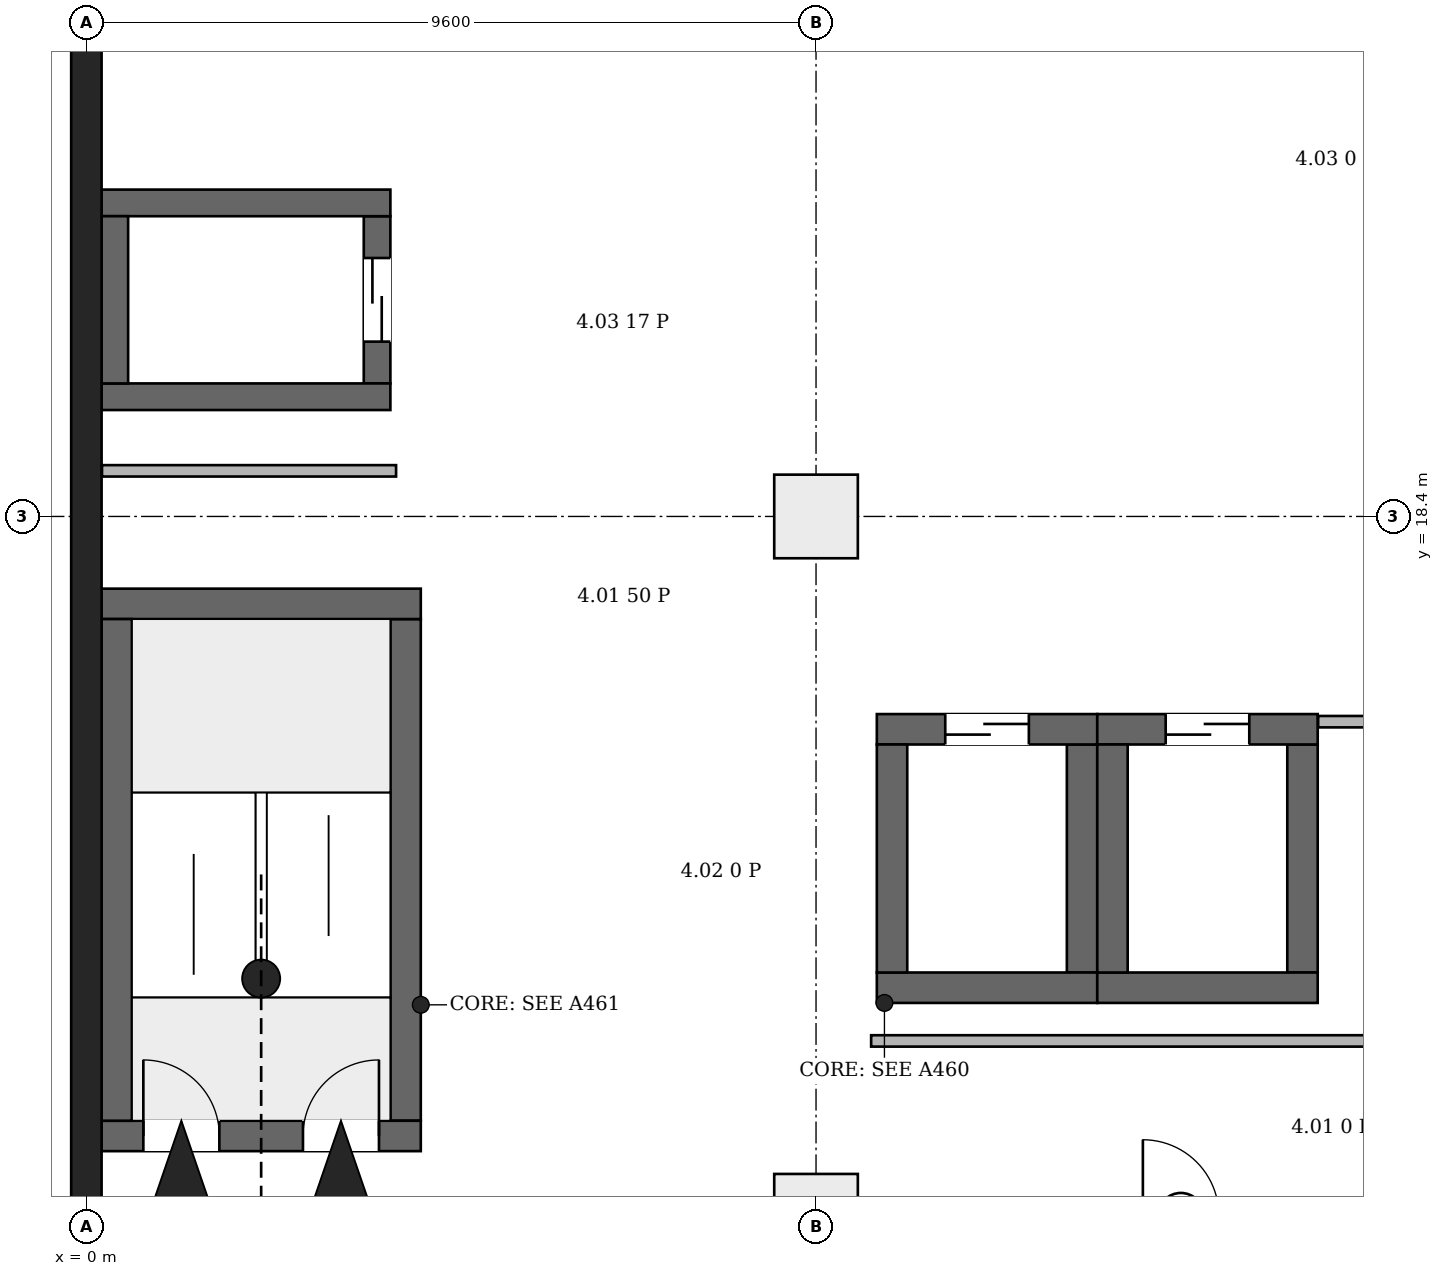
"""IFC4 building model, lengths in metres.
Left out: names, types, materials, properties, quantities, classifications, styles, units other than length and angle.
Written with IfcOpenShell. Run it as: python <this file> out.ifc"""

import sys

from ifc_helpers import new_model, si_unit, direction, frame, frame_2d, origin, origin_2d, place, context, subcontext, project, spatial, rectangle, extrude, element, fill, save


model = new_model("IFC4")
c1 = context("Model", 3, precision=1e-05, world=origin(), true_north=direction((0.0, 1.0)))
c2 = subcontext(c1, "Body", "Model", "MODEL_VIEW")
j1 = project(units=[si_unit("LENGTHUNIT", "METRE"), si_unit("PLANEANGLEUNIT", "RADIAN")], contexts=[c1])
p1 = place(None, origin())
s1 = spatial("IfcSite", under=j1, at=p1, CompositionType="ELEMENT")
p2 = place(p1, origin())
s2 = spatial("IfcBuilding", under=s1, at=p2, CompositionType="ELEMENT")
p3 = place(p2, frame((0.0, 0.0, 26.7)))
s3 = spatial("IfcBuildingStorey", under=s2, at=p3, CompositionType="ELEMENT", Elevation=26.7)
p4 = place(p3, frame((0.0, -0.2, 0.0), z_axis=(0.0, 0.0, 1.0), x_axis=(0.0, 1.0, 0.0)))
e1 = element("IfcWall", 1, at=p4, inside=s3, PredefinedType="SHEAR", context=c2, shape_type="SweptSolid", body=[
    extrude(rectangle(XDim=46.88, YDim=0.4, at=frame_2d((23.44, 0.0))), origin(), (0.0, 0.0, 1.0), 5.2),
])
p5 = place(p3, frame((0.2, 10.25, 0.0), z_axis=(0.0, 0.0, 1.0), x_axis=(1.0, 0.0, 0.0)))
e2 = element("IfcWall", 2, at=p5, inside=s3, PredefinedType="SHEAR", context=c2, shape_type="SweptSolid", body=[
    extrude(rectangle(XDim=4.2, YDim=0.4, at=frame_2d((2.1, 0.0))), origin(), (0.0, 0.0, 1.0), 5.2),
])
p6 = place(p5, frame((0.55, 0.0, 0.0)))
e3 = element("IfcOpeningElement", 3, at=p6, cuts=e2, PredefinedType="OPENING", context=c2, shape_type="SweptSolid", body=[
    extrude(rectangle(XDim=1.0, YDim=2.1, at=frame_2d((0.5, 1.05))), frame((0.0, 0.21, 0.0), z_axis=(0.0, -1.0, 0.0), x_axis=(1.0, 0.0, 0.0)), (0.0, 0.0, 1.0), 0.42),
])
p7 = place(p5, frame((2.65, 0.0, 0.0)))
e4 = element("IfcOpeningElement", 4, at=p7, cuts=e2, PredefinedType="OPENING", context=c2, shape_type="SweptSolid", body=[
    extrude(rectangle(XDim=1.0, YDim=2.1, at=frame_2d((0.5, 1.05))), frame((0.0, 0.21, 0.0), z_axis=(0.0, -1.0, 0.0), x_axis=(1.0, 0.0, 0.0)), (0.0, 0.0, 1.0), 0.42),
])
p8 = place(p3, frame((0.2, 17.25, 0.0), z_axis=(0.0, 0.0, 1.0), x_axis=(1.0, 0.0, 0.0)))
e5 = element("IfcWall", 5, at=p8, inside=s3, PredefinedType="SHEAR", context=c2, shape_type="SweptSolid", body=[
    extrude(rectangle(XDim=4.2, YDim=0.4, at=frame_2d((2.1, 0.0))), origin(), (0.0, 0.0, 1.0), 5.2),
])
for number, where, z_axis, x_axis in (
    (6, (0.4, 10.45, 0.0), (0.0, 0.0, 1.0), (0.0, 1.0, 0.0)),
    (7, (4.2, 10.45, 0.0), (0.0, 0.0, 1.0), (0.0, 1.0, 0.0)),
):
    element("IfcWall", number, at=place(p3, frame(where, z_axis=z_axis, x_axis=x_axis)), inside=s3, PredefinedType="SHEAR", context=c2, shape_type="SweptSolid", body=[
        extrude(rectangle(XDim=6.6, YDim=0.4, at=frame_2d((3.3, 0.0))), origin(), (0.0, 0.0, 1.0), 5.2),
    ])
for number, where, z_axis, x_axis in (
    (8, (0.2, 19.975, 0.0), (0.0, 0.0, 1.0), (1.0, 0.0, 0.0)),
    (9, (0.2, 22.525, 0.0), (0.0, 0.0, 1.0), (1.0, 0.0, 0.0)),
):
    element("IfcWall", number, at=place(p3, frame(where, z_axis=z_axis, x_axis=x_axis)), inside=s3, PredefinedType="SHEAR", context=c2, shape_type="SweptSolid", body=[
        extrude(rectangle(XDim=3.8, YDim=0.35, at=frame_2d((1.9, 0.0))), origin(), (0.0, 0.0, 1.0), 5.2),
    ])
p9 = place(p3, frame((0.375, 20.15, 0.0), z_axis=(0.0, 0.0, 1.0), x_axis=(0.0, 1.0, 0.0)))
e10 = element("IfcWall", 10, at=p9, inside=s3, PredefinedType="SHEAR", context=c2, shape_type="SweptSolid", body=[
    extrude(rectangle(XDim=2.2, YDim=0.35, at=frame_2d((1.1, 0.0))), origin(), (0.0, 0.0, 1.0), 5.2),
])
p10 = place(p3, frame((3.825, 20.15, 0.0), z_axis=(0.0, 0.0, 1.0), x_axis=(0.0, 1.0, 0.0)))
e11 = element("IfcWall", 11, at=p10, inside=s3, PredefinedType="SHEAR", context=c2, shape_type="SweptSolid", body=[
    extrude(rectangle(XDim=2.2, YDim=0.35, at=frame_2d((1.1, 0.0))), origin(), (0.0, 0.0, 1.0), 5.2),
])
p11 = place(p10, frame((0.55, 0.0, 0.0)))
e12 = element("IfcOpeningElement", 12, at=p11, cuts=e11, PredefinedType="OPENING", context=c2, shape_type="SweptSolid", body=[
    extrude(rectangle(XDim=1.1, YDim=2.1, at=frame_2d((0.55, 1.05))), frame((0.0, 0.185, 0.0), z_axis=(0.0, -1.0, 0.0), x_axis=(1.0, 0.0, 0.0)), (0.0, 0.0, 1.0), 0.37),
])
p12 = place(p3, frame((10.4, 12.2, 0.0), z_axis=(0.0, 0.0, 1.0), x_axis=(1.0, 0.0, 0.0)))
e13 = element("IfcWall", 13, at=p12, inside=s3, PredefinedType="SHEAR", context=c2, shape_type="SweptSolid", body=[
    extrude(rectangle(XDim=2.9, YDim=0.4, at=frame_2d((1.45, 0.0))), origin(), (0.0, 0.0, 1.0), 5.2),
])
p13 = place(p3, frame((10.4, 15.6, 0.0), z_axis=(0.0, 0.0, 1.0), x_axis=(1.0, 0.0, 0.0)))
e14 = element("IfcWall", 14, at=p13, inside=s3, PredefinedType="SHEAR", context=c2, shape_type="SweptSolid", body=[
    extrude(rectangle(XDim=2.9, YDim=0.4, at=frame_2d((1.45, 0.0))), origin(), (0.0, 0.0, 1.0), 5.2),
])
p14 = place(p13, frame((0.9, 0.0, 0.0)))
e15 = element("IfcOpeningElement", 15, at=p14, cuts=e14, PredefinedType="OPENING", context=c2, shape_type="SweptSolid", body=[
    extrude(rectangle(XDim=1.1, YDim=2.1, at=frame_2d((0.55, 1.05))), frame((0.0, 0.21, 0.0), z_axis=(0.0, -1.0, 0.0), x_axis=(1.0, 0.0, 0.0)), (0.0, 0.0, 1.0), 0.42),
])
for number, where, z_axis, x_axis in (
    (16, (10.6, 12.4, 0.0), (0.0, 0.0, 1.0), (0.0, 1.0, 0.0)),
    (17, (13.1, 12.4, 0.0), (0.0, 0.0, 1.0), (0.0, 1.0, 0.0)),
):
    element("IfcWall", number, at=place(p3, frame(where, z_axis=z_axis, x_axis=x_axis)), inside=s3, PredefinedType="SHEAR", context=c2, shape_type="SweptSolid", body=[
        extrude(rectangle(XDim=3.0, YDim=0.4, at=frame_2d((1.5, 0.0))), origin(), (0.0, 0.0, 1.0), 5.2),
    ])
p15 = place(p3, frame((13.3, 12.2, 0.0), z_axis=(0.0, 0.0, 1.0), x_axis=(1.0, 0.0, 0.0)))
e18 = element("IfcWall", 18, at=p15, inside=s3, PredefinedType="SHEAR", context=c2, shape_type="SweptSolid", body=[
    extrude(rectangle(XDim=2.9, YDim=0.4, at=frame_2d((1.45, 0.0))), origin(), (0.0, 0.0, 1.0), 5.2),
])
p16 = place(p3, frame((13.3, 15.6, 0.0), z_axis=(0.0, 0.0, 1.0), x_axis=(1.0, 0.0, 0.0)))
e19 = element("IfcWall", 19, at=p16, inside=s3, PredefinedType="SHEAR", context=c2, shape_type="SweptSolid", body=[
    extrude(rectangle(XDim=2.9, YDim=0.4, at=frame_2d((1.45, 0.0))), origin(), (0.0, 0.0, 1.0), 5.2),
])
p17 = place(p16, frame((0.9, 0.0, 0.0)))
e20 = element("IfcOpeningElement", 20, at=p17, cuts=e19, PredefinedType="OPENING", context=c2, shape_type="SweptSolid", body=[
    extrude(rectangle(XDim=1.1, YDim=2.1, at=frame_2d((0.55, 1.05))), frame((0.0, 0.21, 0.0), z_axis=(0.0, -1.0, 0.0), x_axis=(1.0, 0.0, 0.0)), (0.0, 0.0, 1.0), 0.42),
])
for number, where, z_axis, x_axis in (
    (21, (13.5, 12.4, 0.0), (0.0, 0.0, 1.0), (0.0, 1.0, 0.0)),
    (22, (16.0, 12.4, 0.0), (0.0, 0.0, 1.0), (0.0, 1.0, 0.0)),
):
    element("IfcWall", number, at=place(p3, frame(where, z_axis=z_axis, x_axis=x_axis)), inside=s3, PredefinedType="SHEAR", context=c2, shape_type="SweptSolid", body=[
        extrude(rectangle(XDim=3.0, YDim=0.4, at=frame_2d((1.5, 0.0))), origin(), (0.0, 0.0, 1.0), 5.2),
    ])
for number, where, z_axis, x_axis in (
    (23, (9.6, 9.2, 0.0), (0.0, 0.0, 1.0), (1.0, 0.0, 0.0)),
    (24, (9.6, 18.4, 0.0), (0.0, 0.0, 1.0), (1.0, 0.0, 0.0)),
):
    element("IfcColumn", number, at=place(p3, frame(where, z_axis=z_axis, x_axis=x_axis)), inside=s3, PredefinedType="COLUMN", context=c2, shape_type="SweptSolid", body=[
        extrude(rectangle(XDim=1.1, YDim=1.1, at=origin_2d()), origin(), (0.0, 0.0, 1.0), 5.2),
    ])
p18 = place(p3, frame((0.206, 19.0, 0.0), z_axis=(0.0, 0.0, 1.0), x_axis=(1.0, 0.0, 0.0)))
e25 = element("IfcWall", 25, at=p18, inside=s3, PredefinedType="PARTITIONING", context=c2, shape_type="SweptSolid", body=[
    extrude(rectangle(XDim=3.869, YDim=0.15, at=frame_2d((1.935, 0.0))), origin(), (0.0, 0.0, 1.0), 4.85),
])
p19 = place(p3, frame((10.325, 11.5, 0.0), z_axis=(0.0, 0.0, 1.0), x_axis=(1.0, 0.0, 0.0)))
e26 = element("IfcWall", 26, at=p19, inside=s3, PredefinedType="PARTITIONING", context=c2, shape_type="SweptSolid", body=[
    extrude(rectangle(XDim=9.569, YDim=0.15, at=frame_2d((4.785, 0.0))), origin(), (0.0, 0.0, 1.0), 4.85),
])
p20 = place(p3, frame((16.206, 15.7, 0.0), z_axis=(0.0, 0.0, 1.0), x_axis=(1.0, 0.0, 0.0)))
e27 = element("IfcWall", 27, at=p20, inside=s3, PredefinedType="PARTITIONING", context=c2, shape_type="SweptSolid", body=[
    extrude(rectangle(XDim=3.688, YDim=0.15, at=frame_2d((1.844, 0.0))), origin(), (0.0, 0.0, 1.0), 4.85),
])
p21 = place(p6, origin())
e28 = element("IfcDoor", 28, at=p21, inside=s3, OperationType="SINGLE_SWING_RIGHT", PredefinedType="DOOR", context=c2, shape_type="SweptSolid", body=[
    extrude(rectangle(XDim=1.0, YDim=2.1, at=frame_2d((0.5, 1.05))), frame((0.0, 0.025, 0.0), z_axis=(0.0, -1.0, 0.0), x_axis=(1.0, 0.0, 0.0)), (0.0, 0.0, 1.0), 0.05),
])
fill(e3, e28)
p22 = place(p7, origin())
e29 = element("IfcDoor", 29, at=p22, inside=s3, OperationType="SINGLE_SWING_LEFT", PredefinedType="DOOR", context=c2, shape_type="SweptSolid", body=[
    extrude(rectangle(XDim=1.0, YDim=2.1, at=frame_2d((0.5, 1.05))), frame((0.0, 0.025, 0.0), z_axis=(0.0, -1.0, 0.0), x_axis=(1.0, 0.0, 0.0)), (0.0, 0.0, 1.0), 0.05),
])
fill(e4, e29)
p23 = place(p11, origin())
e30 = element("IfcDoor", 30, at=p23, inside=s3, OperationType="DOUBLE_DOOR_SLIDING", PredefinedType="DOOR", context=c2, shape_type="SweptSolid", body=[
    extrude(rectangle(XDim=1.1, YDim=2.1, at=frame_2d((0.55, 1.05))), frame((0.0, 0.025, 0.0), z_axis=(0.0, -1.0, 0.0), x_axis=(1.0, 0.0, 0.0)), (0.0, 0.0, 1.0), 0.05),
])
fill(e12, e30)
p24 = place(p14, origin())
e31 = element("IfcDoor", 31, at=p24, inside=s3, OperationType="DOUBLE_DOOR_SLIDING", PredefinedType="DOOR", context=c2, shape_type="SweptSolid", body=[
    extrude(rectangle(XDim=1.1, YDim=2.1, at=frame_2d((0.55, 1.05))), frame((0.0, 0.025, 0.0), z_axis=(0.0, -1.0, 0.0), x_axis=(1.0, 0.0, 0.0)), (0.0, 0.0, 1.0), 0.05),
])
fill(e15, e31)
p25 = place(p17, origin())
e32 = element("IfcDoor", 32, at=p25, inside=s3, OperationType="DOUBLE_DOOR_SLIDING", PredefinedType="DOOR", context=c2, shape_type="SweptSolid", body=[
    extrude(rectangle(XDim=1.1, YDim=2.1, at=frame_2d((0.55, 1.05))), frame((0.0, 0.025, 0.0), z_axis=(0.0, -1.0, 0.0), x_axis=(1.0, 0.0, 0.0)), (0.0, 0.0, 1.0), 0.05),
])
fill(e20, e32)
save(model, sys.argv[1])
